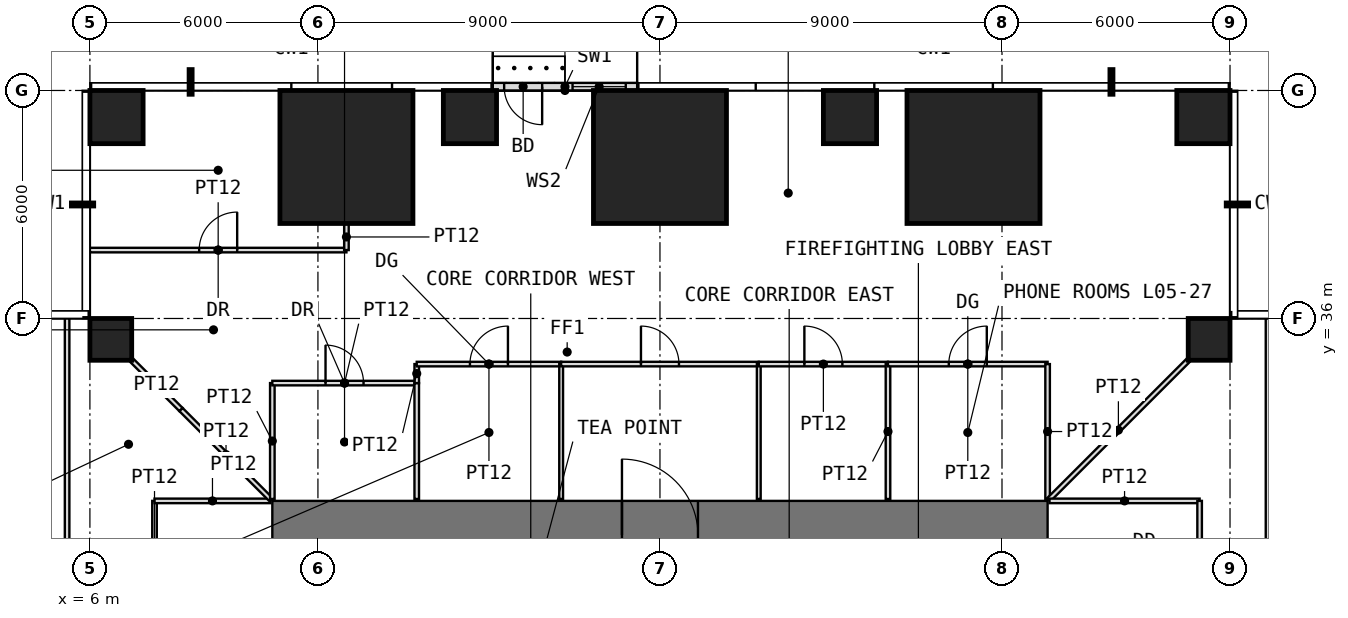
"""IFC4 building model, lengths in metres.
Left out: names, types, materials, properties, quantities, classifications, styles, units other than length and angle.
Written with IfcOpenShell. Run it as: python <this file> out.ifc"""

import sys

from ifc_helpers import new_model, si_unit, direction, frame, frame_2d, origin, origin_2d, place, context, subcontext, project, spatial, rectangle, extrude, element, fill, save


model = new_model("IFC4")
c1 = context("Model", 3, precision=1e-05, world=origin(), true_north=direction((0.0, 1.0)))
c2 = subcontext(c1, "Body", "Model", "MODEL_VIEW")
j1 = project(units=[si_unit("LENGTHUNIT", "METRE"), si_unit("PLANEANGLEUNIT", "RADIAN")], contexts=[c1])
p1 = place(None, origin())
s1 = spatial("IfcSite", under=j1, at=p1, CompositionType="ELEMENT")
p2 = place(p1, origin())
s2 = spatial("IfcBuilding", under=s1, at=p2, CompositionType="ELEMENT")
p3 = place(p2, frame((0.0, 0.0, 26.5)))
s3 = spatial("IfcBuildingStorey", under=s2, at=p3, CompositionType="ELEMENT", Elevation=26.5)
for number, where, z_axis, x_axis in (
    (1, (6.55, 35.45, 0.0), (0.0, 0.0, 1.0), (1.0, 0.0, 0.0)),
    (2, (35.45, 35.45, 0.0), (0.0, 0.0, 1.0), (1.0, 0.0, 0.0)),
):
    element("IfcColumn", number, at=place(p3, frame(where, z_axis=z_axis, x_axis=x_axis)), inside=s3, PredefinedType="COLUMN", context=c2, shape_type="SweptSolid", body=[
        extrude(rectangle(XDim=1.1, YDim=1.1, at=origin_2d()), origin(), (0.0, 0.0, 1.0), 4.0),
    ])
p4 = place(p3, frame((6.7, 41.3, 0.0), z_axis=(0.0, 0.0, 1.0), x_axis=(1.0, 0.0, 0.0)))
e3 = element("IfcColumn", 3, at=p4, inside=s3, PredefinedType="COLUMN", context=c2, shape_type="SweptSolid", body=[
    extrude(rectangle(XDim=1.4, YDim=1.4, at=origin_2d()), origin(), (0.0, 0.0, 1.0), 4.0),
])
p5 = place(p3, frame((12.75, 40.25, 0.0), z_axis=(0.0, 0.0, 1.0), x_axis=(1.0, 0.0, 0.0)))
e4 = element("IfcColumn", 4, at=p5, inside=s3, PredefinedType="COLUMN", context=c2, shape_type="SweptSolid", body=[
    extrude(rectangle(XDim=3.5, YDim=3.5, at=origin_2d()), origin(), (0.0, 0.0, 1.0), 4.0),
])
p6 = place(p3, frame((16.0, 41.3, 0.0), z_axis=(0.0, 0.0, 1.0), x_axis=(1.0, 0.0, 0.0)))
e5 = element("IfcColumn", 5, at=p6, inside=s3, PredefinedType="COLUMN", context=c2, shape_type="SweptSolid", body=[
    extrude(rectangle(XDim=1.4, YDim=1.4, at=origin_2d()), origin(), (0.0, 0.0, 1.0), 4.0),
])
p7 = place(p3, frame((21.0, 40.25, 0.0), z_axis=(0.0, 0.0, 1.0), x_axis=(1.0, 0.0, 0.0)))
e6 = element("IfcColumn", 6, at=p7, inside=s3, PredefinedType="COLUMN", context=c2, shape_type="SweptSolid", body=[
    extrude(rectangle(XDim=3.5, YDim=3.5, at=origin_2d()), origin(), (0.0, 0.0, 1.0), 4.0),
])
p8 = place(p3, frame((26.0, 41.3, 0.0), z_axis=(0.0, 0.0, 1.0), x_axis=(1.0, 0.0, 0.0)))
e7 = element("IfcColumn", 7, at=p8, inside=s3, PredefinedType="COLUMN", context=c2, shape_type="SweptSolid", body=[
    extrude(rectangle(XDim=1.4, YDim=1.4, at=origin_2d()), origin(), (0.0, 0.0, 1.0), 4.0),
])
p9 = place(p3, frame((29.25, 40.25, 0.0), z_axis=(0.0, 0.0, 1.0), x_axis=(1.0, 0.0, 0.0)))
e8 = element("IfcColumn", 8, at=p9, inside=s3, PredefinedType="COLUMN", context=c2, shape_type="SweptSolid", body=[
    extrude(rectangle(XDim=3.5, YDim=3.5, at=origin_2d()), origin(), (0.0, 0.0, 1.0), 4.0),
])
p10 = place(p3, frame((35.3, 41.3, 0.0), z_axis=(0.0, 0.0, 1.0), x_axis=(1.0, 0.0, 0.0)))
e9 = element("IfcColumn", 9, at=p10, inside=s3, PredefinedType="COLUMN", context=c2, shape_type="SweptSolid", body=[
    extrude(rectangle(XDim=1.4, YDim=1.4, at=origin_2d()), origin(), (0.0, 0.0, 1.0), 4.0),
])
p11 = place(p3, frame((20.4, 42.1, 0.0), z_axis=(0.0, 0.0, 1.0), x_axis=(-1.0, 0.0, 0.0)))
e10 = element("IfcWall", 10, at=p11, inside=s3, PredefinedType="USERDEFINED", context=c2, shape_type="SweptSolid", body=[
    extrude(rectangle(XDim=3.8, YDim=0.2, at=frame_2d((1.9, 0.0))), origin(), (0.0, 0.0, 1.0), 3.75),
])
p12 = place(p11, frame((2.5, 0.0, 0.0)))
e11 = element("IfcOpeningElement", 11, at=p12, cuts=e10, PredefinedType="OPENING", context=c2, shape_type="SweptSolid", body=[
    extrude(rectangle(XDim=1.0, YDim=2.4, at=frame_2d((0.5, 1.2))), frame((0.0, 0.11, 0.0), z_axis=(0.0, -1.0, 0.0), x_axis=(1.0, 0.0, 0.0)), (0.0, 0.0, 1.0), 0.22),
])
p13 = place(p11, frame((0.3, 0.0, 0.3)))
e12 = element("IfcOpeningElement", 12, at=p13, cuts=e10, PredefinedType="OPENING", context=c2, shape_type="SweptSolid", body=[
    extrude(rectangle(XDim=1.4, YDim=2.7, at=frame_2d((0.7, 1.35))), frame((0.0, 0.11, 0.0), z_axis=(0.0, -1.0, 0.0), x_axis=(1.0, 0.0, 0.0)), (0.0, 0.0, 1.0), 0.22),
])
p14 = place(p3, frame((10.8, 30.3, -0.05), z_axis=(0.0, 0.0, 1.0), x_axis=(1.0, 0.0, 0.0)))
e13 = element("IfcWall", 13, at=p14, inside=s3, PredefinedType="SHEAR", context=c2, shape_type="SweptSolid", body=[
    extrude(rectangle(XDim=20.4, YDim=1.8, at=frame_2d((10.2, 0.0))), origin(), (0.0, 0.0, 1.0), 4.0),
])
p15 = place(p14, frame((9.2, 0.0, 0.05)))
e14 = element("IfcOpeningElement", 14, at=p15, cuts=e13, PredefinedType="OPENING", context=c2, shape_type="SweptSolid", body=[
    extrude(rectangle(XDim=2.0, YDim=2.2, at=frame_2d((1.0, 1.1))), frame((0.0, 0.91, 0.0), z_axis=(0.0, -1.0, 0.0), x_axis=(1.0, 0.0, 0.0)), (0.0, 0.0, 1.0), 1.82),
])
p16 = place(p3, frame((5.4, 6.0, 0.0), z_axis=(0.0, 0.0, 1.0), x_axis=(0.0, 1.0, 0.0)))
e15 = element("IfcWall", 15, at=p16, inside=s3, PredefinedType="PARTITIONING", context=c2, shape_type="SweptSolid", body=[
    extrude(rectangle(XDim=30.0, YDim=0.12, at=frame_2d((15.0, 0.0))), origin(), (0.0, 0.0, 1.0), 3.75),
])
p17 = place(p16, frame((14.5, 0.0, 0.0)))
e16 = element("IfcOpeningElement", 16, at=p17, cuts=e15, PredefinedType="OPENING", context=c2, shape_type="SweptSolid", body=[
    extrude(rectangle(XDim=1.0, YDim=2.4, at=frame_2d((0.5, 1.2))), frame((0.0, 0.07, 0.0), z_axis=(0.0, -1.0, 0.0), x_axis=(1.0, 0.0, 0.0)), (0.0, 0.0, 1.0), 0.14),
])
p18 = place(p3, frame((6.0, 37.8, 0.0), z_axis=(0.0, 0.0, 1.0), x_axis=(1.0, 0.0, 0.0)))
e17 = element("IfcWall", 17, at=p18, inside=s3, PredefinedType="PARTITIONING", context=c2, shape_type="SweptSolid", body=[
    extrude(rectangle(XDim=6.75, YDim=0.12, at=frame_2d((3.375, 0.0))), origin(), (0.0, 0.0, 1.0), 3.75),
])
p19 = place(p18, frame((2.875, 0.0, 0.0)))
e18 = element("IfcOpeningElement", 18, at=p19, cuts=e17, PredefinedType="OPENING", context=c2, shape_type="SweptSolid", body=[
    extrude(rectangle(XDim=1.0, YDim=2.2, at=frame_2d((0.5, 1.1))), frame((0.0, 0.07, 0.0), z_axis=(0.0, -1.0, 0.0), x_axis=(1.0, 0.0, 0.0)), (0.0, 0.0, 1.0), 0.14),
])
p20 = place(p3, frame((7.11, 34.89, 0.0), z_axis=(0.0, 0.0, 1.0), x_axis=(0.707106781187, -0.707106781187, 0.0)))
e19 = element("IfcWall", 19, at=p20, inside=s3, PredefinedType="PARTITIONING", context=c2, shape_type="SweptSolid", body=[
    extrude(rectangle(XDim=1.822, YDim=0.12, at=frame_2d((0.911, 0.0))), origin(), (0.0, 0.0, 1.0), 3.75),
])
p21 = place(p3, frame((7.7, 28.0, 0.0), z_axis=(0.0, 0.0, 1.0), x_axis=(0.0, 1.0, 0.0)))
e20 = element("IfcWall", 20, at=p21, inside=s3, PredefinedType="PARTITIONING", context=c2, shape_type="SweptSolid", body=[
    extrude(rectangle(XDim=3.2, YDim=0.12, at=frame_2d((1.6, 0.0))), origin(), (0.0, 0.0, 1.0), 3.75),
])
p22 = place(p21, frame((1.1, 0.0, 0.0)))
e21 = element("IfcOpeningElement", 21, at=p22, cuts=e20, PredefinedType="OPENING", context=c2, shape_type="SweptSolid", body=[
    extrude(rectangle(XDim=1.0, YDim=2.2, at=frame_2d((0.5, 1.1))), frame((0.0, 0.07, 0.0), z_axis=(0.0, -1.0, 0.0), x_axis=(1.0, 0.0, 0.0)), (0.0, 0.0, 1.0), 0.14),
])
p23 = place(p3, frame((7.7, 31.2, 0.0), z_axis=(0.0, 0.0, 1.0), x_axis=(1.0, 0.0, 0.0)))
e22 = element("IfcWall", 22, at=p23, inside=s3, PredefinedType="PARTITIONING", context=c2, shape_type="SweptSolid", body=[
    extrude(rectangle(XDim=3.05, YDim=0.12, at=frame_2d((1.525, 0.0))), origin(), (0.0, 0.0, 1.0), 3.75),
])
p24 = place(p3, frame((8.398, 33.602, 0.0), z_axis=(0.0, 0.0, 1.0), x_axis=(0.707106781187, -0.707106781187, 0.0)))
e23 = element("IfcWall", 23, at=p24, inside=s3, PredefinedType="PARTITIONING", context=c2, shape_type="SweptSolid", body=[
    extrude(rectangle(XDim=3.346, YDim=0.12, at=frame_2d((1.673, 0.0))), origin(), (0.0, 0.0, 1.0), 3.75),
])
p25 = place(p3, frame((10.8, 31.25, 0.0), z_axis=(0.0, 0.0, 1.0), x_axis=(0.0, 1.0, 0.0)))
e24 = element("IfcWall", 24, at=p25, inside=s3, PredefinedType="PARTITIONING", context=c2, shape_type="SweptSolid", body=[
    extrude(rectangle(XDim=3.05, YDim=0.12, at=frame_2d((1.525, 0.0))), origin(), (0.0, 0.0, 1.0), 3.75),
])
p26 = place(p3, frame((10.8, 34.3, 0.0), z_axis=(0.0, 0.0, 1.0), x_axis=(1.0, 0.0, 0.0)))
e25 = element("IfcWall", 25, at=p26, inside=s3, PredefinedType="PARTITIONING", context=c2, shape_type="SweptSolid", body=[
    extrude(rectangle(XDim=3.8, YDim=0.12, at=frame_2d((1.9, 0.0))), origin(), (0.0, 0.0, 1.0), 3.75),
])
p27 = place(p26, frame((1.4, 0.0, 0.0)))
e26 = element("IfcOpeningElement", 26, at=p27, cuts=e25, PredefinedType="OPENING", context=c2, shape_type="SweptSolid", body=[
    extrude(rectangle(XDim=1.0, YDim=2.2, at=frame_2d((0.5, 1.1))), frame((0.0, 0.07, 0.0), z_axis=(0.0, -1.0, 0.0), x_axis=(1.0, 0.0, 0.0)), (0.0, 0.0, 1.0), 0.14),
])
p28 = place(p3, frame((12.75, 37.8, 0.0), z_axis=(0.0, 0.0, 1.0), x_axis=(0.0, 1.0, 0.0)))
e27 = element("IfcWall", 27, at=p28, inside=s3, PredefinedType="PARTITIONING", context=c2, shape_type="SweptSolid", body=[
    extrude(rectangle(XDim=0.69, YDim=0.12, at=frame_2d((0.345, 0.0))), origin(), (0.0, 0.0, 1.0), 3.75),
])
p29 = place(p3, frame((14.6, 31.25, 0.0), z_axis=(0.0, 0.0, 1.0), x_axis=(0.0, 1.0, 0.0)))
e28 = element("IfcWall", 28, at=p29, inside=s3, PredefinedType="PARTITIONING", context=c2, shape_type="SweptSolid", body=[
    extrude(rectangle(XDim=3.05, YDim=0.12, at=frame_2d((1.525, 0.0))), origin(), (0.0, 0.0, 1.0), 3.75),
])
p30 = place(p3, frame((14.6, 34.3, 0.0), z_axis=(0.0, 0.0, 1.0), x_axis=(0.0, 1.0, 0.0)))
e29 = element("IfcWall", 29, at=p30, inside=s3, PredefinedType="PARTITIONING", context=c2, shape_type="SweptSolid", body=[
    extrude(rectangle(XDim=0.5, YDim=0.12, at=frame_2d((0.25, 0.0))), origin(), (0.0, 0.0, 1.0), 3.75),
])
p31 = place(p3, frame((14.6, 34.8, 0.0), z_axis=(0.0, 0.0, 1.0), x_axis=(1.0, 0.0, 0.0)))
e30 = element("IfcWall", 30, at=p31, inside=s3, PredefinedType="PARTITIONING", context=c2, shape_type="SweptSolid", body=[
    extrude(rectangle(XDim=3.8, YDim=0.12, at=frame_2d((1.9, 0.0))), origin(), (0.0, 0.0, 1.0), 3.75),
])
p32 = place(p31, frame((1.4, 0.0, 0.0)))
e31 = element("IfcOpeningElement", 31, at=p32, cuts=e30, PredefinedType="OPENING", context=c2, shape_type="SweptSolid", body=[
    extrude(rectangle(XDim=1.0, YDim=2.4, at=frame_2d((0.5, 1.2))), frame((0.0, 0.07, 0.0), z_axis=(0.0, -1.0, 0.0), x_axis=(1.0, 0.0, 0.0)), (0.0, 0.0, 1.0), 0.14),
])
p33 = place(p3, frame((18.4, 31.25, 0.0), z_axis=(0.0, 0.0, 1.0), x_axis=(0.0, 1.0, 0.0)))
e32 = element("IfcWall", 32, at=p33, inside=s3, PredefinedType="PARTITIONING", context=c2, shape_type="SweptSolid", body=[
    extrude(rectangle(XDim=3.55, YDim=0.1, at=frame_2d((1.775, 0.0))), origin(), (0.0, 0.0, 1.0), 3.75),
])
p34 = place(p3, frame((18.4, 34.8, 0.0), z_axis=(0.0, 0.0, 1.0), x_axis=(1.0, 0.0, 0.0)))
e33 = element("IfcWall", 33, at=p34, inside=s3, PredefinedType="PARTITIONING", context=c2, shape_type="SweptSolid", body=[
    extrude(rectangle(XDim=5.2, YDim=0.12, at=frame_2d((2.6, 0.0))), origin(), (0.0, 0.0, 1.0), 3.75),
])
p35 = place(p34, frame((2.1, 0.0, 0.0)))
e34 = element("IfcOpeningElement", 34, at=p35, cuts=e33, PredefinedType="OPENING", context=c2, shape_type="SweptSolid", body=[
    extrude(rectangle(XDim=1.0, YDim=2.4, at=frame_2d((0.5, 1.2))), frame((0.0, 0.07, 0.0), z_axis=(0.0, -1.0, 0.0), x_axis=(1.0, 0.0, 0.0)), (0.0, 0.0, 1.0), 0.14),
])
p36 = place(p3, frame((23.6, 31.25, 0.0), z_axis=(0.0, 0.0, 1.0), x_axis=(0.0, 1.0, 0.0)))
e35 = element("IfcWall", 35, at=p36, inside=s3, PredefinedType="PARTITIONING", context=c2, shape_type="SweptSolid", body=[
    extrude(rectangle(XDim=3.55, YDim=0.1, at=frame_2d((1.775, 0.0))), origin(), (0.0, 0.0, 1.0), 3.75),
])
p37 = place(p3, frame((23.6, 34.8, 0.0), z_axis=(0.0, 0.0, 1.0), x_axis=(1.0, 0.0, 0.0)))
e36 = element("IfcWall", 36, at=p37, inside=s3, PredefinedType="PARTITIONING", context=c2, shape_type="SweptSolid", body=[
    extrude(rectangle(XDim=3.4, YDim=0.12, at=frame_2d((1.7, 0.0))), origin(), (0.0, 0.0, 1.0), 3.75),
])
p38 = place(p37, frame((1.2, 0.0, 0.0)))
e37 = element("IfcOpeningElement", 37, at=p38, cuts=e36, PredefinedType="OPENING", context=c2, shape_type="SweptSolid", body=[
    extrude(rectangle(XDim=1.0, YDim=2.4, at=frame_2d((0.5, 1.2))), frame((0.0, 0.07, 0.0), z_axis=(0.0, -1.0, 0.0), x_axis=(1.0, 0.0, 0.0)), (0.0, 0.0, 1.0), 0.14),
])
p39 = place(p3, frame((27.0, 31.25, 0.0), z_axis=(0.0, 0.0, 1.0), x_axis=(0.0, 1.0, 0.0)))
e38 = element("IfcWall", 38, at=p39, inside=s3, PredefinedType="PARTITIONING", context=c2, shape_type="SweptSolid", body=[
    extrude(rectangle(XDim=3.55, YDim=0.12, at=frame_2d((1.775, 0.0))), origin(), (0.0, 0.0, 1.0), 3.75),
])
p40 = place(p3, frame((27.0, 34.8, 0.0), z_axis=(0.0, 0.0, 1.0), x_axis=(1.0, 0.0, 0.0)))
e39 = element("IfcWall", 39, at=p40, inside=s3, PredefinedType="PARTITIONING", context=c2, shape_type="SweptSolid", body=[
    extrude(rectangle(XDim=4.2, YDim=0.12, at=frame_2d((2.1, 0.0))), origin(), (0.0, 0.0, 1.0), 3.75),
])
p41 = place(p40, frame((1.6, 0.0, 0.0)))
e40 = element("IfcOpeningElement", 40, at=p41, cuts=e39, PredefinedType="OPENING", context=c2, shape_type="SweptSolid", body=[
    extrude(rectangle(XDim=1.0, YDim=2.4, at=frame_2d((0.5, 1.2))), frame((0.0, 0.07, 0.0), z_axis=(0.0, -1.0, 0.0), x_axis=(1.0, 0.0, 0.0)), (0.0, 0.0, 1.0), 0.14),
])
p42 = place(p3, frame((31.2, 31.25, 0.0), z_axis=(0.0, 0.0, 1.0), x_axis=(0.0, 1.0, 0.0)))
e41 = element("IfcWall", 41, at=p42, inside=s3, PredefinedType="PARTITIONING", context=c2, shape_type="SweptSolid", body=[
    extrude(rectangle(XDim=3.55, YDim=0.12, at=frame_2d((1.775, 0.0))), origin(), (0.0, 0.0, 1.0), 3.75),
])
p43 = place(p3, frame((31.235, 31.235, 0.0), z_axis=(0.0, 0.0, 1.0), x_axis=(0.707106781187, 0.707106781187, 0.0)))
e42 = element("IfcWall", 42, at=p43, inside=s3, PredefinedType="PARTITIONING", context=c2, shape_type="SweptSolid", body=[
    extrude(rectangle(XDim=5.168, YDim=0.12, at=frame_2d((2.584, 0.0))), origin(), (0.0, 0.0, 1.0), 3.75),
])
p44 = place(p3, frame((31.25, 31.2, 0.0), z_axis=(0.0, 0.0, 1.0), x_axis=(1.0, 0.0, 0.0)))
e43 = element("IfcWall", 43, at=p44, inside=s3, PredefinedType="PARTITIONING", context=c2, shape_type="SweptSolid", body=[
    extrude(rectangle(XDim=3.95, YDim=0.12, at=frame_2d((1.975, 0.0))), origin(), (0.0, 0.0, 1.0), 3.75),
])
p45 = place(p3, frame((35.2, 24.0, 0.0), z_axis=(0.0, 0.0, 1.0), x_axis=(0.0, 1.0, 0.0)))
e44 = element("IfcWall", 44, at=p45, inside=s3, PredefinedType="PARTITIONING", context=c2, shape_type="SweptSolid", body=[
    extrude(rectangle(XDim=7.2, YDim=0.12, at=frame_2d((3.6, 0.0))), origin(), (0.0, 0.0, 1.0), 3.75),
])
p46 = place(p45, frame((2.7, 0.0, 0.0)))
e45 = element("IfcOpeningElement", 45, at=p46, cuts=e44, PredefinedType="OPENING", context=c2, shape_type="SweptSolid", body=[
    extrude(rectangle(XDim=1.8, YDim=2.4, at=frame_2d((0.9, 1.2))), frame((0.0, 0.07, 0.0), z_axis=(0.0, -1.0, 0.0), x_axis=(1.0, 0.0, 0.0)), (0.0, 0.0, 1.0), 0.14),
])
p47 = place(p3, frame((37.0, 6.0, 0.0), z_axis=(0.0, 0.0, 1.0), x_axis=(0.0, 1.0, 0.0)))
e46 = element("IfcWall", 46, at=p47, inside=s3, PredefinedType="PARTITIONING", context=c2, shape_type="SweptSolid", body=[
    extrude(rectangle(XDim=30.0, YDim=0.12, at=frame_2d((15.0, 0.0))), origin(), (0.0, 0.0, 1.0), 3.75),
])
p48 = place(p47, frame((14.5, 0.0, 0.0)))
e47 = element("IfcOpeningElement", 47, at=p48, cuts=e46, PredefinedType="OPENING", context=c2, shape_type="SweptSolid", body=[
    extrude(rectangle(XDim=1.0, YDim=2.4, at=frame_2d((0.5, 1.2))), frame((0.0, 0.07, 0.0), z_axis=(0.0, -1.0, 0.0), x_axis=(1.0, 0.0, 0.0)), (0.0, 0.0, 1.0), 0.14),
])
p49 = place(p12, origin())
e48 = element("IfcDoor", 48, at=p49, inside=s3, OperationType="SINGLE_SWING_LEFT", PredefinedType="DOOR", context=c2, shape_type="SweptSolid", body=[
    extrude(rectangle(XDim=1.0, YDim=2.4, at=frame_2d((0.5, 1.2))), frame((0.0, 0.025, 0.0), z_axis=(0.0, -1.0, 0.0), x_axis=(1.0, 0.0, 0.0)), (0.0, 0.0, 1.0), 0.05),
])
fill(e11, e48)
p50 = place(p13, origin())
e49 = element("IfcWindow", 49, at=p50, inside=s3, PartitioningType="SINGLE_PANEL", PredefinedType="WINDOW", context=c2, shape_type="SweptSolid", body=[
    extrude(rectangle(XDim=1.4, YDim=2.7, at=frame_2d((0.7, 1.35))), frame((0.0, 0.03, 0.0), z_axis=(0.0, -1.0, 0.0), x_axis=(1.0, 0.0, 0.0)), (0.0, 0.0, 1.0), 0.06),
])
fill(e12, e49)
p51 = place(p15, origin())
e50 = element("IfcDoor", 50, at=p51, inside=s3, OperationType="DOUBLE_DOOR_SINGLE_SWING", PredefinedType="DOOR", context=c2, shape_type="SweptSolid", body=[
    extrude(rectangle(XDim=2.0, YDim=2.2, at=frame_2d((1.0, 1.1))), frame((0.0, 0.025, 0.0), z_axis=(0.0, -1.0, 0.0), x_axis=(1.0, 0.0, 0.0)), (0.0, 0.0, 1.0), 0.05),
])
fill(e14, e50)
p52 = place(p27, origin())
e51 = element("IfcDoor", 51, at=p52, inside=s3, OperationType="SINGLE_SWING_LEFT", PredefinedType="DOOR", context=c2, shape_type="SweptSolid", body=[
    extrude(rectangle(XDim=1.0, YDim=2.2, at=frame_2d((0.5, 1.1))), frame((0.0, 0.025, 0.0), z_axis=(0.0, -1.0, 0.0), x_axis=(1.0, 0.0, 0.0)), (0.0, 0.0, 1.0), 0.05),
])
fill(e26, e51)
p53 = place(p32, origin())
e52 = element("IfcDoor", 52, at=p53, inside=s3, OperationType="SINGLE_SWING_RIGHT", PredefinedType="DOOR", context=c2, shape_type="SweptSolid", body=[
    extrude(rectangle(XDim=1.0, YDim=2.4, at=frame_2d((0.5, 1.2))), frame((0.0, 0.025, 0.0), z_axis=(0.0, -1.0, 0.0), x_axis=(1.0, 0.0, 0.0)), (0.0, 0.0, 1.0), 0.05),
])
fill(e31, e52)
p54 = place(p38, origin())
e53 = element("IfcDoor", 53, at=p54, inside=s3, OperationType="SINGLE_SWING_LEFT", PredefinedType="DOOR", context=c2, shape_type="SweptSolid", body=[
    extrude(rectangle(XDim=1.0, YDim=2.4, at=frame_2d((0.5, 1.2))), frame((0.0, 0.025, 0.0), z_axis=(0.0, -1.0, 0.0), x_axis=(1.0, 0.0, 0.0)), (0.0, 0.0, 1.0), 0.05),
])
fill(e37, e53)
p55 = place(p41, origin())
e54 = element("IfcDoor", 54, at=p55, inside=s3, OperationType="SINGLE_SWING_RIGHT", PredefinedType="DOOR", context=c2, shape_type="SweptSolid", body=[
    extrude(rectangle(XDim=1.0, YDim=2.4, at=frame_2d((0.5, 1.2))), frame((0.0, 0.025, 0.0), z_axis=(0.0, -1.0, 0.0), x_axis=(1.0, 0.0, 0.0)), (0.0, 0.0, 1.0), 0.05),
])
fill(e40, e54)
p56 = place(p19, origin())
e55 = element("IfcDoor", 55, at=p56, inside=s3, OperationType="SINGLE_SWING_RIGHT", PredefinedType="DOOR", context=c2, shape_type="SweptSolid", body=[
    extrude(rectangle(XDim=1.0, YDim=2.2, at=frame_2d((0.5, 1.1))), frame((0.0, 0.025, 0.0), z_axis=(0.0, -1.0, 0.0), x_axis=(1.0, 0.0, 0.0)), (0.0, 0.0, 1.0), 0.05),
])
fill(e18, e55)
p57 = place(p35, origin())
e56 = element("IfcDoor", 56, at=p57, inside=s3, OperationType="SINGLE_SWING_LEFT", PredefinedType="DOOR", context=c2, shape_type="SweptSolid", body=[
    extrude(rectangle(XDim=1.0, YDim=2.4, at=frame_2d((0.5, 1.2))), frame((0.0, 0.025, 0.0), z_axis=(0.0, -1.0, 0.0), x_axis=(1.0, 0.0, 0.0)), (0.0, 0.0, 1.0), 0.05),
])
fill(e34, e56)
save(model, sys.argv[1])
